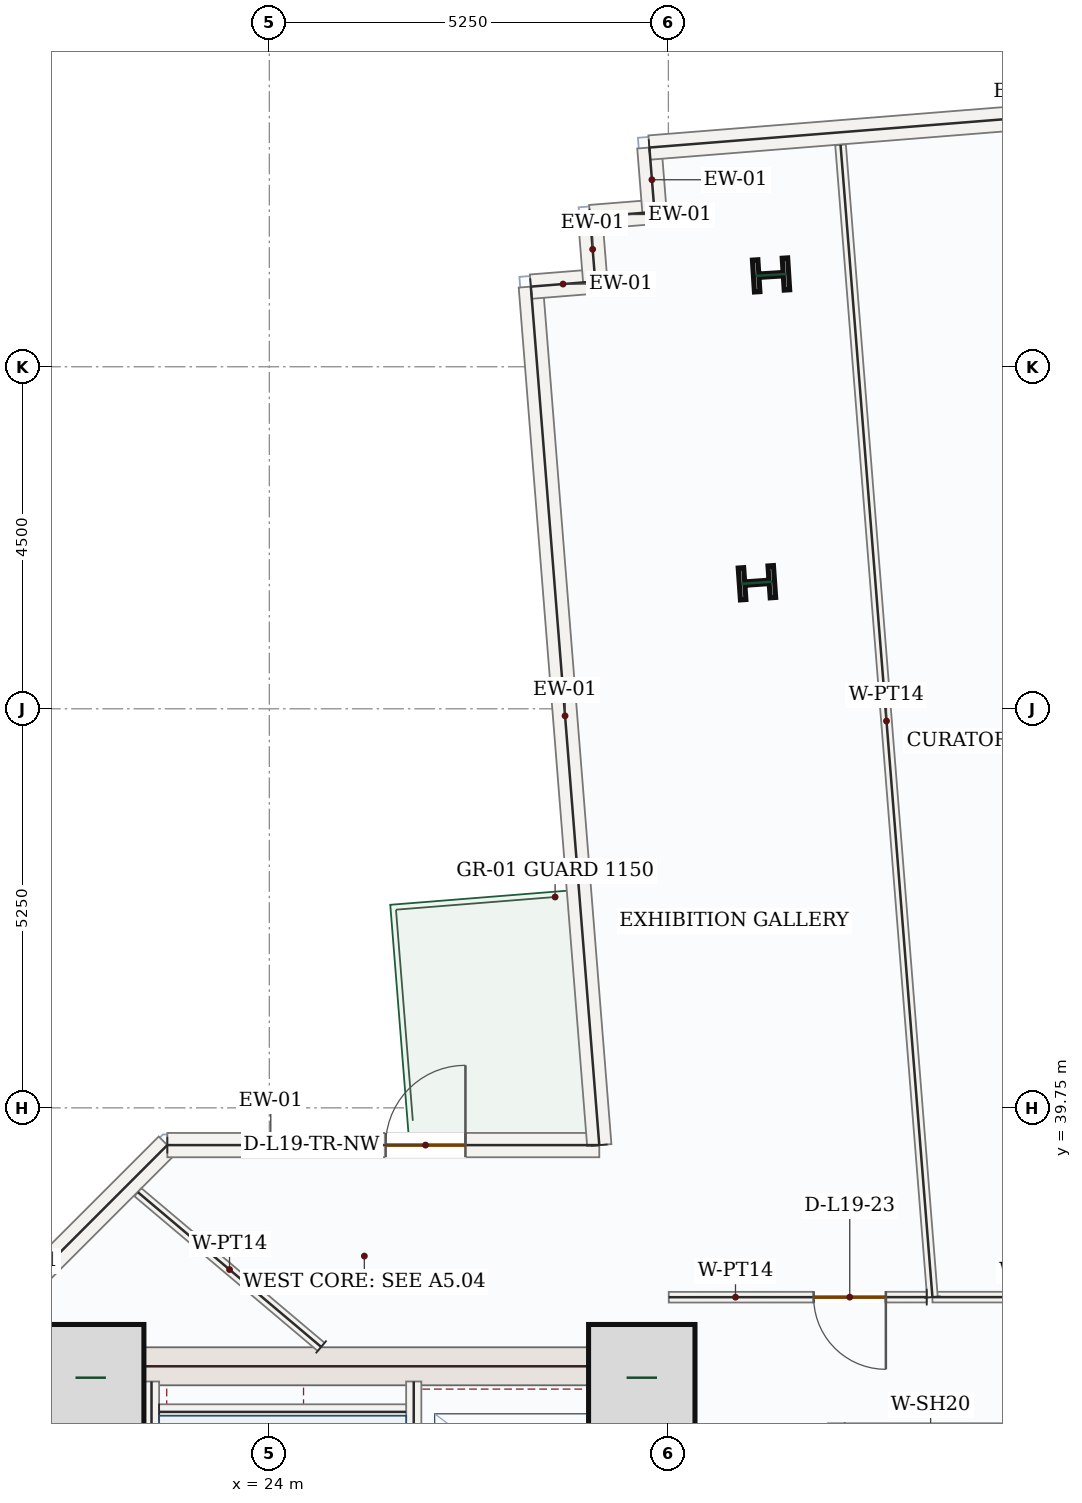
"""IFC4 building model, lengths in metres.
Left out: names, types, materials, properties, quantities, classifications, styles, units other than length and angle.
Written with IfcOpenShell. Run it as: python <this file> out.ifc"""

import sys

from ifc_helpers import new_model, si_unit, direction, frame, frame_2d, origin, origin_2d, place, context, subcontext, project, spatial, rectangle, i_section, extrude, source, transform, mapped, element, fill, save


model = new_model("IFC4")
c1 = context("Model", 3, precision=1e-05, world=origin(), true_north=direction((0.0, 1.0)))
c2 = subcontext(c1, "Body", "Model", "MODEL_VIEW")
j1 = project(units=[si_unit("LENGTHUNIT", "METRE"), si_unit("PLANEANGLEUNIT", "RADIAN")], contexts=[c1])
p1 = place(None, origin())
s1 = spatial("IfcSite", under=j1, at=p1, CompositionType="ELEMENT")
p2 = place(p1, origin())
s2 = spatial("IfcBuilding", under=s1, at=p2, CompositionType="ELEMENT")
p3 = place(p2, frame((0.0, 0.0, 87.9)))
s3 = spatial("IfcBuildingStorey", under=s2, at=p3, CompositionType="ELEMENT", Elevation=87.9)
m1 = source(origin(), c2, "Body", "SweptSolid", [
    extrude(rectangle(XDim=8.55, YDim=0.5, at=frame_2d((4.275, 0.0))), origin(), (0.0, 0.0, 1.0), 3.95),
])
p4 = place(p3, frame((21.5, 28.05, 0.0), z_axis=(0.0, 0.0, 1.0), x_axis=(0.0, 1.0, 0.0)))
e1 = element("IfcWall", 1, at=p4, inside=s3, PredefinedType="SHEAR", context=c2, shape_type="MappedRepresentation", body=[
    mapped(m1, transform((0.0, 0.0, 0.0), x_axis=(1.0, 0.0, 0.0), y_axis=(0.0, 1.0, 0.0), z_axis=(0.0, 0.0, 1.0), scale=1.0)),
])
p5 = place(p3, frame((29.0, 28.05, 0.0), z_axis=(0.0, 0.0, 1.0), x_axis=(0.0, 1.0, 0.0)))
e2 = element("IfcWall", 2, at=p5, inside=s3, PredefinedType="SHEAR", context=c2, shape_type="SweptSolid", body=[
    extrude(rectangle(XDim=8.55, YDim=0.5, at=frame_2d((4.275, 0.0))), origin(), (0.0, 0.0, 1.0), 3.95),
])
p6 = place(p5, frame((1.5, 0.0, 0.0)))
e3 = element("IfcOpeningElement", 3, at=p6, cuts=e2, PredefinedType="OPENING", context=c2, shape_type="SweptSolid", body=[
    extrude(rectangle(XDim=1.1, YDim=2.2, at=frame_2d((0.55, 1.1))), frame((0.0, 0.26, 0.0), z_axis=(0.0, -1.0, 0.0), x_axis=(1.0, 0.0, 0.0)), (0.0, 0.0, 1.0), 0.52),
])
m2 = source(origin(), c2, "Body", "SweptSolid", [
    extrude(rectangle(XDim=7.0, YDim=0.5, at=frame_2d((3.5, 0.0))), origin(), (0.0, 0.0, 1.0), 3.95),
])
p7 = place(p3, frame((21.75, 36.35, 0.0), z_axis=(0.0, 0.0, 1.0), x_axis=(1.0, 0.0, 0.0)))
e4 = element("IfcWall", 4, at=p7, inside=s3, PredefinedType="SHEAR", context=c2, shape_type="MappedRepresentation", body=[
    mapped(m2, transform((0.0, 0.0, 0.0), x_axis=(1.0, 0.0, 0.0), y_axis=(0.0, 1.0, 0.0), z_axis=(0.0, 0.0, 1.0), scale=1.0)),
])
m3 = source(origin(), c2, "Body", "SweptSolid", [
    extrude(rectangle(XDim=1.4, YDim=1.4, at=origin_2d()), origin(), (0.0, 0.0, 1.0), 4.2),
])
for number, where, z_axis, x_axis in (
    (5, (21.65, 36.2, 0.0), (0.0, 0.0, 1.0), (1.0, 0.0, 0.0)),
    (6, (28.9, 36.2, 0.0), (0.0, 0.0, 1.0), (1.0, 0.0, 0.0)),
):
    element("IfcColumn", number, at=place(p3, frame(where, z_axis=z_axis, x_axis=x_axis)), inside=s3, PredefinedType="COLUMN", context=c2, shape_type="MappedRepresentation", body=[
        mapped(m3, transform((0.0, 0.0, 0.0), x_axis=(1.0, 0.0, 0.0), y_axis=(0.0, 1.0, 0.0), z_axis=(0.0, 0.0, 1.0), scale=1.0)),
    ])
m4 = source(origin(), c2, "Body", "SweptSolid", [
    extrude(i_section(OverallWidth=0.421, OverallDepth=0.465, WebThickness=0.045, FlangeThickness=0.073, FilletRadius=0.018, at=origin_2d()), origin(), (0.0, 0.0, 1.0), 4.2),
])
for number, where, z_axis, x_axis in (
    (7, (30.415, 46.658, 0.0), (0.0, 0.0, 1.0), (-0.07, 0.998, 0.0)),
    (8, (30.601, 50.708, 0.0), (0.0, 0.0, 1.0), (-0.063, 0.998, 0.0)),
):
    element("IfcColumn", number, at=place(p3, frame(where, z_axis=z_axis, x_axis=x_axis)), inside=s3, PredefinedType="COLUMN", context=c2, shape_type="MappedRepresentation", body=[
        mapped(m4, transform((0.0, 0.0, 0.0), x_axis=(1.0, 0.0, 0.0), y_axis=(0.0, 1.0, 0.0), z_axis=(0.0, 0.0, 1.0), scale=1.0)),
    ])
m5 = source(origin(), c2, "Body", "SweptSolid", [
    extrude(rectangle(XDim=5.258, YDim=0.32, at=frame_2d((2.629, 0.0))), origin(), (0.0, 0.0, 1.0), 3.95),
])
p8 = place(p3, frame((18.94, 35.542, 0.0), z_axis=(0.0, 0.0, 1.0), x_axis=(0.707106781187, 0.707106781187, 0.0)))
e9 = element("IfcWall", 9, at=p8, inside=s3, PredefinedType="SOLIDWALL", context=c2, shape_type="MappedRepresentation", body=[
    mapped(m5, transform((0.0, 0.0, 0.0), x_axis=(1.0, 0.0, 0.0), y_axis=(0.0, 1.0, 0.0), z_axis=(0.0, 0.0, 1.0), scale=1.0)),
])
p9 = place(p3, frame((22.658, 39.26, 0.0), z_axis=(0.0, 0.0, 1.0), x_axis=(1.0, 0.0, 0.0)))
e10 = element("IfcWall", 10, at=p9, inside=s3, PredefinedType="SOLIDWALL", context=c2, shape_type="SweptSolid", body=[
    extrude(rectangle(XDim=5.683, YDim=0.32, at=frame_2d((2.842, 0.0))), origin(), (0.0, 0.0, 1.0), 3.95),
])
p10 = place(p9, frame((2.872, 0.0, 0.0)))
e11 = element("IfcOpeningElement", 11, at=p10, cuts=e10, PredefinedType="OPENING", context=c2, shape_type="SweptSolid", body=[
    extrude(rectangle(XDim=1.05, YDim=2.15, at=frame_2d((0.525, 1.075))), frame((0.0, 0.17, 0.0), z_axis=(0.0, -1.0, 0.0), x_axis=(1.0, 0.0, 0.0)), (0.0, 0.0, 1.0), 0.34),
])
m6 = source(origin(), c2, "Body", "SweptSolid", [
    extrude(rectangle(XDim=11.33, YDim=0.32, at=frame_2d((5.665, 0.0))), origin(), (0.0, 0.0, 1.0), 3.95),
])
p11 = place(p3, frame((28.341, 39.26, 0.0), z_axis=(0.0, 0.0, 1.0), x_axis=(-0.079512268319, 0.996833887459, 0.0)))
e12 = element("IfcWall", 12, at=p11, inside=s3, PredefinedType="SOLIDWALL", context=c2, shape_type="MappedRepresentation", body=[
    mapped(m6, transform((0.0, 0.0, 0.0), x_axis=(1.0, 0.0, 0.0), y_axis=(0.0, 1.0, 0.0), z_axis=(0.0, 0.0, 1.0), scale=1.0)),
])
m7 = source(origin(), c2, "Body", "SweptSolid", [
    extrude(rectangle(XDim=0.85, YDim=0.32, at=frame_2d((0.425, 0.0))), origin(), (0.0, 0.0, 1.0), 3.95),
])
for number, where, z_axis, x_axis in (
    (13, (27.44, 50.554, 0.0), (0.0, 0.0, 1.0), (0.997, 0.079, 0.0)),
    (14, (28.288, 50.622, 0.0), (0.0, 0.0, 1.0), (-0.08, 0.997, 0.0)),
    (15, (28.22, 51.469, 0.0), (0.0, 0.0, 1.0), (0.997, 0.08, 0.0)),
):
    element("IfcWall", number, at=place(p3, frame(where, z_axis=z_axis, x_axis=x_axis)), inside=s3, PredefinedType="SOLIDWALL", context=c2, shape_type="MappedRepresentation", body=[
        mapped(m7, transform((0.0, 0.0, 0.0), x_axis=(1.0, 0.0, 0.0), y_axis=(0.0, 1.0, 0.0), z_axis=(0.0, 0.0, 1.0), scale=1.0)),
    ])
m8 = source(origin(), c2, "Body", "SweptSolid", [
    extrude(rectangle(XDim=0.85, YDim=0.32, at=frame_2d((0.425, 0.0))), origin(), (0.0, 0.0, 1.0), 3.95),
])
p12 = place(p3, frame((29.067, 51.537, 0.0), z_axis=(0.0, 0.0, 1.0), x_axis=(-0.079573954853, 0.996828965123, 0.0)))
e16 = element("IfcWall", 16, at=p12, inside=s3, PredefinedType="SOLIDWALL", context=c2, shape_type="MappedRepresentation", body=[
    mapped(m8, transform((0.0, 0.0, 0.0), x_axis=(1.0, 0.0, 0.0), y_axis=(0.0, 1.0, 0.0), z_axis=(0.0, 0.0, 1.0), scale=1.0)),
])
m9 = source(origin(), c2, "Body", "SweptSolid", [
    extrude(rectangle(XDim=9.92, YDim=0.32, at=frame_2d((4.96, 0.0))), origin(), (0.0, 0.0, 1.0), 3.95),
])
p13 = place(p3, frame((29.0, 52.384, 0.0), z_axis=(0.0, 0.0, 1.0), x_axis=(0.996833485558, 0.079517306731, 0.0)))
e17 = element("IfcWall", 17, at=p13, inside=s3, PredefinedType="SOLIDWALL", context=c2, shape_type="MappedRepresentation", body=[
    mapped(m9, transform((0.0, 0.0, 0.0), x_axis=(1.0, 0.0, 0.0), y_axis=(0.0, 1.0, 0.0), z_axis=(0.0, 0.0, 1.0), scale=1.0)),
])
m10 = source(origin(), c2, "Body", "SweptSolid", [
    extrude(rectangle(XDim=7.87, YDim=0.2, at=frame_2d((3.935, 0.0))), origin(), (0.0, 0.0, 1.0), 3.95),
])
p14 = place(p3, frame((22.45, 28.28, 0.0), z_axis=(0.0, 0.0, 1.0), x_axis=(0.0, 1.0, 0.0)))
e18 = element("IfcWall", 18, at=p14, inside=s3, PredefinedType="SOLIDWALL", context=c2, shape_type="MappedRepresentation", body=[
    mapped(m10, transform((0.0, 0.0, 0.0), x_axis=(1.0, 0.0, 0.0), y_axis=(0.0, 1.0, 0.0), z_axis=(0.0, 0.0, 1.0), scale=1.0)),
])
p15 = place(p3, frame((25.9, 28.15, 0.0), z_axis=(0.0, 0.0, 1.0), x_axis=(0.0, 1.0, 0.0)))
e19 = element("IfcWall", 19, at=p15, inside=s3, PredefinedType="SOLIDWALL", context=c2, shape_type="SweptSolid", body=[
    extrude(rectangle(XDim=8.0, YDim=0.2, at=frame_2d((4.0, 0.0))), origin(), (0.0, 0.0, 1.0), 3.95),
])
p16 = place(p15, frame((0.4, 0.0, 0.0)))
e20 = element("IfcOpeningElement", 20, at=p16, cuts=e19, PredefinedType="OPENING", context=c2, shape_type="SweptSolid", body=[
    extrude(rectangle(XDim=1.05, YDim=2.15, at=frame_2d((0.525, 1.075))), frame((0.0, 0.11, 0.0), z_axis=(0.0, -1.0, 0.0), x_axis=(1.0, 0.0, 0.0)), (0.0, 0.0, 1.0), 0.22),
])
m11 = source(origin(), c2, "Body", "SweptSolid", [
    extrude(rectangle(XDim=3.25, YDim=0.2, at=frame_2d((1.625, 0.0))), origin(), (0.0, 0.0, 1.0), 3.95),
])
p17 = place(p3, frame((22.55, 35.75, 0.0), z_axis=(0.0, 0.0, 1.0), x_axis=(1.0, 0.0, 0.0)))
e21 = element("IfcWall", 21, at=p17, inside=s3, PredefinedType="SOLIDWALL", context=c2, shape_type="MappedRepresentation", body=[
    mapped(m11, transform((0.0, 0.0, 0.0), x_axis=(1.0, 0.0, 0.0), y_axis=(0.0, 1.0, 0.0), z_axis=(0.0, 0.0, 1.0), scale=1.0)),
])
m12 = source(origin(), c2, "Body", "SweptSolid", [
    extrude(rectangle(XDim=2.4, YDim=0.2, at=frame_2d((1.2, 0.0))), origin(), (0.0, 0.0, 1.0), 3.95),
])
p18 = place(p3, frame((31.45, 33.2, 0.0), z_axis=(0.0, 0.0, 1.0), x_axis=(0.0, 1.0, 0.0)))
e22 = element("IfcWall", 22, at=p18, inside=s3, PredefinedType="SOLIDWALL", context=c2, shape_type="MappedRepresentation", body=[
    mapped(m12, transform((0.0, 0.0, 0.0), x_axis=(1.0, 0.0, 0.0), y_axis=(0.0, 1.0, 0.0), z_axis=(0.0, 0.0, 1.0), scale=1.0)),
])
p19 = place(p3, frame((37.384, 37.26, 0.0), z_axis=(0.0, 0.0, 1.0), x_axis=(-1.0, 0.0, 0.0)))
e23 = element("IfcWall", 23, at=p19, inside=s3, PredefinedType="PARTITIONING", context=c2, shape_type="SweptSolid", body=[
    extrude(rectangle(XDim=4.66, YDim=0.14, at=frame_2d((2.33, 0.0))), origin(), (0.0, 0.0, 1.0), 3.95),
])
p20 = place(p19, frame((0.816, 0.0, 0.0)))
e24 = element("IfcOpeningElement", 24, at=p20, cuts=e23, PredefinedType="OPENING", context=c2, shape_type="SweptSolid", body=[
    extrude(rectangle(XDim=0.95, YDim=2.15, at=frame_2d((0.475, 1.075))), frame((0.0, 0.08, 0.0), z_axis=(0.0, -1.0, 0.0), x_axis=(1.0, 0.0, 0.0)), (0.0, 0.0, 1.0), 0.16),
])
m13 = source(origin(), c2, "Body", "SweptSolid", [
    extrude(rectangle(XDim=15.207, YDim=0.14, at=frame_2d((7.604, 0.0))), origin(), (0.0, 0.0, 1.0), 3.95),
])
p21 = place(p3, frame((32.724, 37.26, 0.0), z_axis=(0.0, 0.0, 1.0), x_axis=(-0.07950146843, 0.996834748851, 0.0)))
e25 = element("IfcWall", 25, at=p21, inside=s3, PredefinedType="PARTITIONING", context=c2, shape_type="MappedRepresentation", body=[
    mapped(m13, transform((0.0, 0.0, 0.0), x_axis=(1.0, 0.0, 0.0), y_axis=(0.0, 1.0, 0.0), z_axis=(0.0, 0.0, 1.0), scale=1.0)),
])
p22 = place(p3, frame((32.649, 37.26, 0.0), z_axis=(0.0, 0.0, 1.0), x_axis=(-0.999999935313, -0.00035968633, 0.0)))
e26 = element("IfcWall", 26, at=p22, inside=s3, PredefinedType="PARTITIONING", context=c2, shape_type="SweptSolid", body=[
    extrude(rectangle(XDim=3.394, YDim=0.14, at=frame_2d((1.697, 0.0))), origin(), (0.0, 0.0, 1.0), 3.95),
])
p23 = place(p22, frame((0.538, 0.0, 0.0)))
e27 = element("IfcOpeningElement", 27, at=p23, cuts=e26, PredefinedType="OPENING", context=c2, shape_type="SweptSolid", body=[
    extrude(rectangle(XDim=0.95, YDim=2.15, at=frame_2d((0.475, 1.075))), frame((0.0, 0.08, 0.0), z_axis=(0.0, -1.0, 0.0), x_axis=(1.0, 0.0, 0.0)), (0.0, 0.0, 1.0), 0.16),
])
m14 = source(origin(), c2, "Body", "SweptSolid", [
    extrude(rectangle(XDim=3.155, YDim=0.14, at=frame_2d((1.577, 0.0))), origin(), (0.0, 0.0, 1.0), 3.95),
])
p24 = place(p3, frame((24.682, 36.605, 0.0), z_axis=(0.0, 0.0, 1.0), x_axis=(-0.76411384058, 0.645081420159, 0.0)))
e28 = element("IfcWall", 28, at=p24, inside=s3, PredefinedType="PARTITIONING", context=c2, shape_type="MappedRepresentation", body=[
    mapped(m14, transform((0.0, 0.0, 0.0), x_axis=(1.0, 0.0, 0.0), y_axis=(0.0, 1.0, 0.0), z_axis=(0.0, 0.0, 1.0), scale=1.0)),
])
m15 = source(origin(), c2, "Body", "SweptSolid", [
    extrude(rectangle(XDim=1.05, YDim=2.15, at=frame_2d((0.525, 1.075))), frame((0.0, 0.025, 0.0), z_axis=(0.0, -1.0, 0.0), x_axis=(1.0, 0.0, 0.0)), (0.0, 0.0, 1.0), 0.05),
])
p25 = place(p10, origin())
e29 = element("IfcDoor", 29, at=p25, inside=s3, OperationType="SINGLE_SWING_RIGHT", PredefinedType="DOOR", context=c2, shape_type="MappedRepresentation", body=[
    mapped(m15, transform((0.0, 0.0, 0.0), x_axis=(1.0, 0.0, 0.0), y_axis=(0.0, 1.0, 0.0), z_axis=(0.0, 0.0, 1.0), scale=1.0)),
])
fill(e11, e29)
m16 = source(origin(), c2, "Body", "SweptSolid", [
    extrude(rectangle(XDim=0.95, YDim=2.15, at=frame_2d((0.475, 1.075))), frame((0.0, 0.025, 0.0), z_axis=(0.0, -1.0, 0.0), x_axis=(1.0, 0.0, 0.0)), (0.0, 0.0, 1.0), 0.05),
])
p26 = place(p23, origin())
e30 = element("IfcDoor", 30, at=p26, inside=s3, OperationType="SINGLE_SWING_LEFT", PredefinedType="DOOR", context=c2, shape_type="MappedRepresentation", body=[
    mapped(m16, transform((0.0, 0.0, 0.0), x_axis=(1.0, 0.0, 0.0), y_axis=(0.0, 1.0, 0.0), z_axis=(0.0, 0.0, 1.0), scale=1.0)),
])
fill(e27, e30)
save(model, sys.argv[1])
